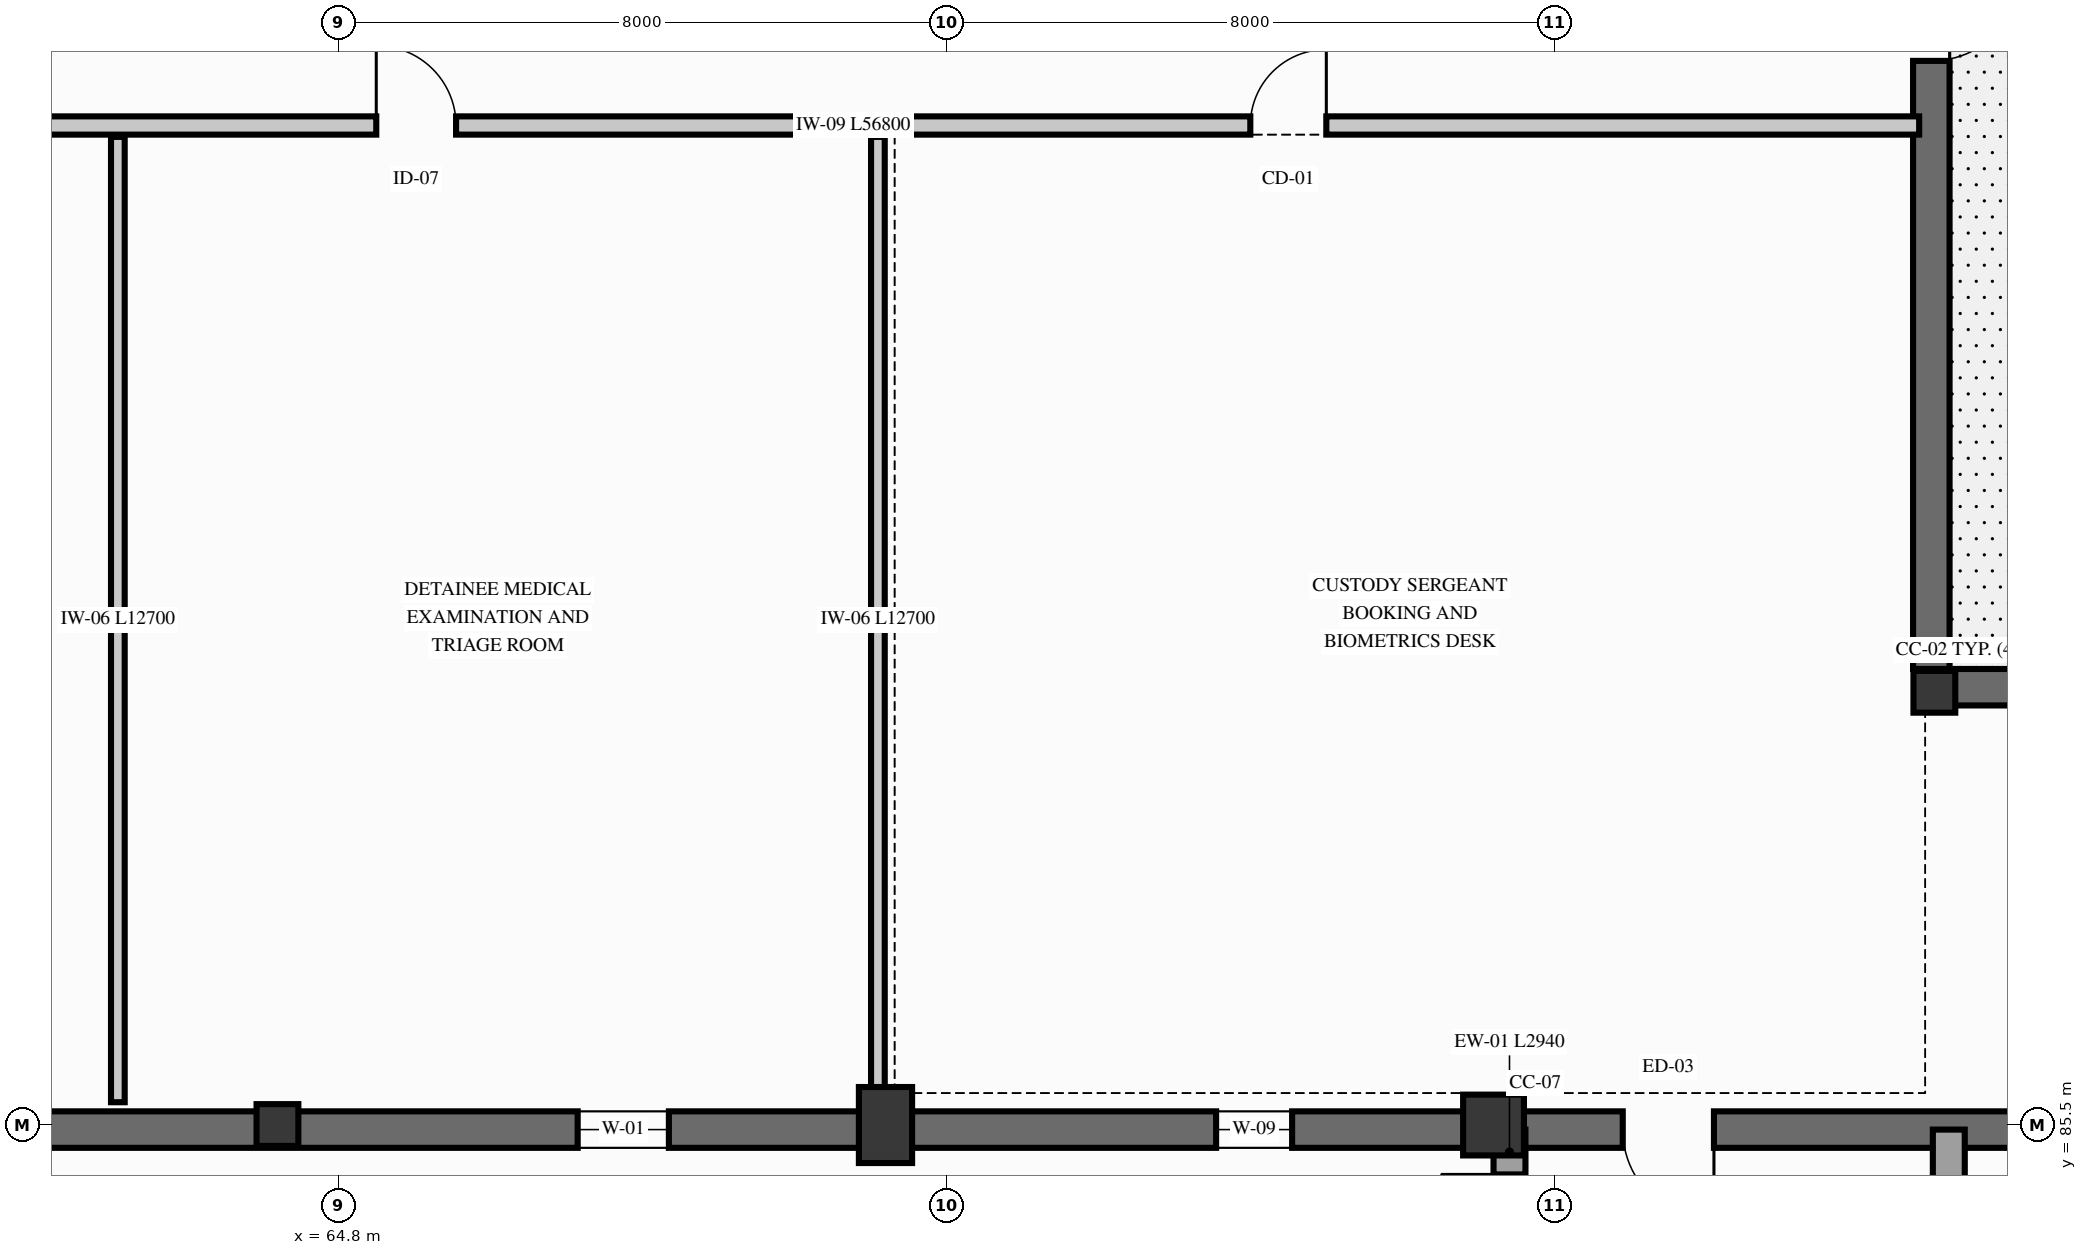
"""IFC4 building model, lengths in metres.
Left out: names, types, materials, properties, quantities, classifications, styles, units other than length and angle.
Written with IfcOpenShell. Run it as: python <this file> out.ifc"""

import sys

from ifc_helpers import new_model, si_unit, direction, frame, frame_2d, origin, origin_2d, place, context, subcontext, project, spatial, rectangle, extrude, element, fill, save


model = new_model("IFC4")
c1 = context("Model", 3, precision=1e-05, world=origin(), true_north=direction((0.0, 1.0)))
c2 = subcontext(c1, "Body", "Model", "MODEL_VIEW")
j1 = project(units=[si_unit("LENGTHUNIT", "METRE"), si_unit("PLANEANGLEUNIT", "RADIAN")], contexts=[c1])
p1 = place(None, origin())
s1 = spatial("IfcSite", under=j1, at=p1, CompositionType="ELEMENT")
p2 = place(p1, origin())
s2 = spatial("IfcBuilding", under=s1, at=p2, CompositionType="ELEMENT")
p3 = place(p2, origin())
s3 = spatial("IfcBuildingStorey", under=s2, at=p3, CompositionType="ELEMENT", Elevation=0.0)
p4 = place(p3, frame((85.8, 91.2, 0.0), z_axis=(0.0, 0.0, 1.0), x_axis=(1.0, 0.0, 0.0)))
e1 = element("IfcColumn", 1, at=p4, inside=s3, PredefinedType="COLUMN", context=c2, shape_type="SweptSolid", body=[
    extrude(rectangle(XDim=0.55, YDim=0.55, at=origin_2d()), origin(), (0.0, 0.0, 1.0), 4.78),
])
p5 = place(p3, frame((64.0, 85.5, 0.0), z_axis=(0.0, 0.0, 1.0), x_axis=(1.0, 0.0, 0.0)))
e2 = element("IfcColumn", 2, at=p5, inside=s3, PredefinedType="COLUMN", context=c2, shape_type="SweptSolid", body=[
    extrude(rectangle(XDim=0.55, YDim=0.55, at=origin_2d()), origin(), (0.0, 0.0, 1.0), 5.1),
])
p6 = place(p3, frame((72.0, 85.5, 0.0), z_axis=(0.0, 0.0, 1.0), x_axis=(1.0, 0.0, 0.0)))
e3 = element("IfcColumn", 3, at=p6, inside=s3, PredefinedType="COLUMN", context=c2, shape_type="SweptSolid", body=[
    extrude(rectangle(XDim=0.7, YDim=1.0, at=origin_2d()), origin(), (0.0, 0.0, 1.0), 5.1),
])
p7 = place(p3, frame((80.0, 85.5, 0.0), z_axis=(0.0, 0.0, 1.0), x_axis=(1.0, 0.0, 0.0)))
e4 = element("IfcColumn", 4, at=p7, inside=s3, PredefinedType="COLUMN", context=c2, shape_type="SweptSolid", body=[
    extrude(rectangle(XDim=0.8, YDim=0.8, at=origin_2d()), origin(), (0.0, 0.0, 1.0), 5.1),
])
p8 = place(p3, frame((28.5, 85.44, 0.0), z_axis=(0.0, 0.0, 1.0), x_axis=(1.0, 0.0, 0.0)))
e5 = element("IfcWall", 5, at=p8, inside=s3, PredefinedType="SOLIDWALL", context=c2, shape_type="SweptSolid", body=[
    extrude(rectangle(XDim=95.25, YDim=0.48, at=frame_2d((47.625, 0.0))), origin(), (0.0, 0.0, 1.0), 4.88),
])
p9 = place(p8, frame((54.4, 0.0, 0.0), z_axis=(0.0, 0.0, 1.0), x_axis=(-1.0, 0.0, 0.0)))
e6 = element("IfcOpeningElement", 6, at=p9, cuts=e5, PredefinedType="OPENING", context=c2, shape_type="SweptSolid", body=[
    extrude(rectangle(XDim=1.2, YDim=2.3, at=frame_2d((0.6, 1.15))), frame((0.0, 0.25, 0.0), z_axis=(0.0, -1.0, 0.0), x_axis=(1.0, 0.0, 0.0)), (0.0, 0.0, 1.0), 0.5),
])
p10 = place(p8, frame((87.1, 0.0, 0.0), z_axis=(0.0, 0.0, 1.0), x_axis=(-1.0, 0.0, 0.0)))
e7 = element("IfcOpeningElement", 7, at=p10, cuts=e5, PredefinedType="OPENING", context=c2, shape_type="SweptSolid", body=[
    extrude(rectangle(XDim=4.8, YDim=3.6, at=frame_2d((2.4, 1.8))), frame((0.0, 0.25, 0.0), z_axis=(0.0, -1.0, 0.0), x_axis=(1.0, 0.0, 0.0)), (0.0, 0.0, 1.0), 0.5),
])
p11 = place(p8, frame((94.65, 0.0, 0.0), z_axis=(0.0, 0.0, 1.0), x_axis=(-1.0, 0.0, 0.0)))
e8 = element("IfcOpeningElement", 8, at=p11, cuts=e5, PredefinedType="OPENING", context=c2, shape_type="SweptSolid", body=[
    extrude(rectangle(XDim=6.0, YDim=2.8, at=frame_2d((3.0, 1.4))), frame((0.0, 0.25, 0.0), z_axis=(0.0, -1.0, 0.0), x_axis=(1.0, 0.0, 0.0)), (0.0, 0.0, 1.0), 0.5),
])
p12 = place(p8, frame((1.65, 0.0, 1.35)))
e9 = element("IfcOpeningElement", 9, at=p12, cuts=e5, PredefinedType="OPENING", context=c2, shape_type="SweptSolid", body=[
    extrude(rectangle(XDim=1.4, YDim=2.2, at=frame_2d((0.7, 1.1))), frame((0.0, 0.25, 0.0), z_axis=(0.0, -1.0, 0.0), x_axis=(1.0, 0.0, 0.0)), (0.0, 0.0, 1.0), 0.5),
])
p13 = place(p8, frame((5.85, 0.0, 1.35)))
e10 = element("IfcOpeningElement", 10, at=p13, cuts=e5, PredefinedType="OPENING", context=c2, shape_type="SweptSolid", body=[
    extrude(rectangle(XDim=1.2, YDim=2.1, at=frame_2d((0.6, 1.05))), frame((0.0, 0.25, 0.0), z_axis=(0.0, -1.0, 0.0), x_axis=(1.0, 0.0, 0.0)), (0.0, 0.0, 1.0), 0.5),
])
p14 = place(p8, frame((14.25, 0.0, 1.35)))
e11 = element("IfcOpeningElement", 11, at=p14, cuts=e5, PredefinedType="OPENING", context=c2, shape_type="SweptSolid", body=[
    extrude(rectangle(XDim=1.0, YDim=1.6, at=frame_2d((0.5, 0.8))), frame((0.0, 0.25, 0.0), z_axis=(0.0, -1.0, 0.0), x_axis=(1.0, 0.0, 0.0)), (0.0, 0.0, 1.0), 0.5),
])
p15 = place(p8, frame((22.65, 0.0, 1.35)))
e12 = element("IfcOpeningElement", 12, at=p15, cuts=e5, PredefinedType="OPENING", context=c2, shape_type="SweptSolid", body=[
    extrude(rectangle(XDim=1.2, YDim=2.1, at=frame_2d((0.6, 1.05))), frame((0.0, 0.25, 0.0), z_axis=(0.0, -1.0, 0.0), x_axis=(1.0, 0.0, 0.0)), (0.0, 0.0, 1.0), 0.5),
])
p16 = place(p8, frame((39.45, 0.0, 1.35)))
e13 = element("IfcOpeningElement", 13, at=p16, cuts=e5, PredefinedType="OPENING", context=c2, shape_type="SweptSolid", body=[
    extrude(rectangle(XDim=1.2, YDim=2.1, at=frame_2d((0.6, 1.05))), frame((0.0, 0.25, 0.0), z_axis=(0.0, -1.0, 0.0), x_axis=(1.0, 0.0, 0.0)), (0.0, 0.0, 1.0), 0.5),
])
p17 = place(p8, frame((47.85, 0.0, 1.35)))
e14 = element("IfcOpeningElement", 14, at=p17, cuts=e5, PredefinedType="OPENING", context=c2, shape_type="SweptSolid", body=[
    extrude(rectangle(XDim=1.0, YDim=1.6, at=frame_2d((0.5, 0.8))), frame((0.0, 0.25, 0.0), z_axis=(0.0, -1.0, 0.0), x_axis=(1.0, 0.0, 0.0)), (0.0, 0.0, 1.0), 0.5),
])
p18 = place(p3, frame((85.76, 91.26, 0.0), z_axis=(0.0, 0.0, 1.0), x_axis=(1.0, 0.0, 0.0)))
e15 = element("IfcWall", 15, at=p18, inside=s3, PredefinedType="SOLIDWALL", context=c2, shape_type="SweptSolid", body=[
    extrude(rectangle(XDim=16.48, YDim=0.48, at=frame_2d((8.24, 0.0))), origin(), (0.0, 0.0, 1.0), 4.74),
])
p19 = place(p3, frame((85.76, 91.5, 0.0), z_axis=(0.0, 0.0, 1.0), x_axis=(0.0, 1.0, 0.0)))
e16 = element("IfcWall", 16, at=p19, inside=s3, PredefinedType="SOLIDWALL", context=c2, shape_type="SweptSolid", body=[
    extrude(rectangle(XDim=17.0, YDim=0.48, at=frame_2d((8.5, 0.0))), origin(), (0.0, 0.0, 1.0), 4.74),
])
p20 = place(p19, frame((9.2, 0.0, 0.0), z_axis=(0.0, 0.0, 1.0), x_axis=(-1.0, 0.0, 0.0)))
e17 = element("IfcOpeningElement", 17, at=p20, cuts=e16, PredefinedType="OPENING", context=c2, shape_type="SweptSolid", body=[
    extrude(rectangle(XDim=1.2, YDim=2.3, at=frame_2d((0.6, 1.15))), frame((0.0, 0.25, 0.0), z_axis=(0.0, -1.0, 0.0), x_axis=(1.0, 0.0, 0.0)), (0.0, 0.0, 1.0), 0.5),
])
p21 = place(p3, frame((80.21, 82.5, 0.0), z_axis=(0.0, 0.0, 1.0), x_axis=(0.0, 1.0, 0.0)))
e18 = element("IfcWall", 18, at=p21, inside=s3, PredefinedType="SOLIDWALL", context=c2, shape_type="SweptSolid", body=[
    extrude(rectangle(XDim=2.94, YDim=0.42, at=frame_2d((1.47, 0.0))), origin(), (0.0, 0.0, 1.0), 4.558),
])
p22 = place(p21, frame((0.55, 0.0, 0.0)))
e19 = element("IfcOpeningElement", 19, at=p22, cuts=e18, PredefinedType="OPENING", context=c2, shape_type="SweptSolid", body=[
    extrude(rectangle(XDim=1.8, YDim=2.4, at=frame_2d((0.9, 1.2))), frame((0.0, 0.22, 0.0), z_axis=(0.0, -1.0, 0.0), x_axis=(1.0, 0.0, 0.0)), (0.0, 0.0, 1.0), 0.44),
])
p23 = place(p3, frame((85.99, 82.0, 0.0), z_axis=(0.0, 0.0, 1.0), x_axis=(0.0, 1.0, 0.0)))
e20 = element("IfcWall", 20, at=p23, inside=s3, PredefinedType="SOLIDWALL", context=c2, shape_type="SweptSolid", body=[
    extrude(rectangle(XDim=3.44, YDim=0.42, at=frame_2d((1.72, 0.0))), origin(), (0.0, 0.0, 1.0), 4.558),
])
p24 = place(p3, frame((28.8, 98.65, 0.0), z_axis=(0.0, 0.0, 1.0), x_axis=(1.0, 0.0, 0.0)))
e21 = element("IfcWall", 21, at=p24, inside=s3, PredefinedType="PARTITIONING", context=c2, shape_type="SweptSolid", body=[
    extrude(rectangle(XDim=56.8, YDim=0.24, at=frame_2d((28.4, 0.0))), origin(), (0.0, 0.0, 1.0), 4.298),
])
p25 = place(p24, frame((8.0, 0.0, 0.0)))
e22 = element("IfcOpeningElement", 22, at=p25, cuts=e21, PredefinedType="OPENING", context=c2, shape_type="SweptSolid", body=[
    extrude(rectangle(XDim=1.0, YDim=2.15, at=frame_2d((0.5, 1.075))), frame((0.0, 0.13, 0.0), z_axis=(0.0, -1.0, 0.0), x_axis=(1.0, 0.0, 0.0)), (0.0, 0.0, 1.0), 0.26),
])
p26 = place(p24, frame((22.0, 0.0, 0.0)))
e23 = element("IfcOpeningElement", 23, at=p26, cuts=e21, PredefinedType="OPENING", context=c2, shape_type="SweptSolid", body=[
    extrude(rectangle(XDim=1.0, YDim=2.15, at=frame_2d((0.5, 1.075))), frame((0.0, 0.13, 0.0), z_axis=(0.0, -1.0, 0.0), x_axis=(1.0, 0.0, 0.0)), (0.0, 0.0, 1.0), 0.26),
])
p27 = place(p24, frame((36.5, 0.0, 0.0)))
e24 = element("IfcOpeningElement", 24, at=p27, cuts=e21, PredefinedType="OPENING", context=c2, shape_type="SweptSolid", body=[
    extrude(rectangle(XDim=1.05, YDim=2.2, at=frame_2d((0.525, 1.1))), frame((0.0, 0.13, 0.0), z_axis=(0.0, -1.0, 0.0), x_axis=(1.0, 0.0, 0.0)), (0.0, 0.0, 1.0), 0.26),
])
p28 = place(p24, frame((48.0, 0.0, 0.0)))
e25 = element("IfcOpeningElement", 25, at=p28, cuts=e21, PredefinedType="OPENING", context=c2, shape_type="SweptSolid", body=[
    extrude(rectangle(XDim=1.0, YDim=2.15, at=frame_2d((0.5, 1.075))), frame((0.0, 0.13, 0.0), z_axis=(0.0, -1.0, 0.0), x_axis=(1.0, 0.0, 0.0)), (0.0, 0.0, 1.0), 0.26),
])
p29 = place(p3, frame((61.9, 85.8, 0.0), z_axis=(0.0, 0.0, 1.0), x_axis=(0.0, 1.0, 0.0)))
e26 = element("IfcWall", 26, at=p29, inside=s3, PredefinedType="PARTITIONING", context=c2, shape_type="SweptSolid", body=[
    extrude(rectangle(XDim=12.7, YDim=0.18, at=frame_2d((6.35, 0.0))), origin(), (0.0, 0.0, 1.0), 4.86),
])
p30 = place(p3, frame((71.9, 85.8, 0.0), z_axis=(0.0, 0.0, 1.0), x_axis=(0.0, 1.0, 0.0)))
e27 = element("IfcWall", 27, at=p30, inside=s3, PredefinedType="PARTITIONING", context=c2, shape_type="SweptSolid", body=[
    extrude(rectangle(XDim=12.7, YDim=0.18, at=frame_2d((6.35, 0.0))), origin(), (0.0, 0.0, 1.0), 4.3),
])
p31 = place(p9, origin())
e28 = element("IfcDoor", 28, at=p31, inside=s3, OperationType="SINGLE_SWING_LEFT", PredefinedType="DOOR", context=c2, shape_type="SweptSolid", body=[
    extrude(rectangle(XDim=1.2, YDim=2.3, at=frame_2d((0.6, 1.15))), frame((0.0, 0.025, 0.0), z_axis=(0.0, -1.0, 0.0), x_axis=(1.0, 0.0, 0.0)), (0.0, 0.0, 1.0), 0.05),
])
fill(e6, e28)
p32 = place(p20, origin())
e29 = element("IfcDoor", 29, at=p32, inside=s3, OperationType="SINGLE_SWING_LEFT", PredefinedType="DOOR", context=c2, shape_type="SweptSolid", body=[
    extrude(rectangle(XDim=1.2, YDim=2.3, at=frame_2d((0.6, 1.15))), frame((0.0, 0.025, 0.0), z_axis=(0.0, -1.0, 0.0), x_axis=(1.0, 0.0, 0.0)), (0.0, 0.0, 1.0), 0.05),
])
fill(e17, e29)
p33 = place(p16, origin())
e30 = element("IfcWindow", 30, at=p33, inside=s3, PartitioningType="SINGLE_PANEL", PredefinedType="WINDOW", context=c2, shape_type="SweptSolid", body=[
    extrude(rectangle(XDim=1.2, YDim=2.1, at=frame_2d((0.6, 1.05))), frame((0.0, 0.03, 0.0), z_axis=(0.0, -1.0, 0.0), x_axis=(1.0, 0.0, 0.0)), (0.0, 0.0, 1.0), 0.06),
])
fill(e13, e30)
p34 = place(p17, origin())
e31 = element("IfcWindow", 31, at=p34, inside=s3, PartitioningType="SINGLE_PANEL", PredefinedType="WINDOW", context=c2, shape_type="SweptSolid", body=[
    extrude(rectangle(XDim=1.0, YDim=1.6, at=frame_2d((0.5, 0.8))), frame((0.0, 0.03, 0.0), z_axis=(0.0, -1.0, 0.0), x_axis=(1.0, 0.0, 0.0)), (0.0, 0.0, 1.0), 0.06),
])
fill(e14, e31)
p35 = place(p22, origin())
e32 = element("IfcDoor", 32, at=p35, inside=s3, OperationType="DOUBLE_DOOR_SINGLE_SWING", PredefinedType="DOOR", context=c2, shape_type="SweptSolid", body=[
    extrude(rectangle(XDim=1.8, YDim=2.4, at=frame_2d((0.9, 1.2))), frame((0.0, 0.025, 0.0), z_axis=(0.0, -1.0, 0.0), x_axis=(1.0, 0.0, 0.0)), (0.0, 0.0, 1.0), 0.05),
])
fill(e19, e32)
p36 = place(p27, origin())
e33 = element("IfcDoor", 33, at=p36, inside=s3, OperationType="SINGLE_SWING_LEFT", PredefinedType="DOOR", context=c2, shape_type="SweptSolid", body=[
    extrude(rectangle(XDim=1.05, YDim=2.2, at=frame_2d((0.525, 1.1))), frame((0.0, 0.025, 0.0), z_axis=(0.0, -1.0, 0.0), x_axis=(1.0, 0.0, 0.0)), (0.0, 0.0, 1.0), 0.05),
])
fill(e24, e33)
p37 = place(p28, origin())
e34 = element("IfcDoor", 34, at=p37, inside=s3, OperationType="SINGLE_SWING_RIGHT", PredefinedType="DOOR", context=c2, shape_type="SweptSolid", body=[
    extrude(rectangle(XDim=1.0, YDim=2.15, at=frame_2d((0.5, 1.075))), frame((0.0, 0.025, 0.0), z_axis=(0.0, -1.0, 0.0), x_axis=(1.0, 0.0, 0.0)), (0.0, 0.0, 1.0), 0.05),
])
fill(e25, e34)
save(model, sys.argv[1])
